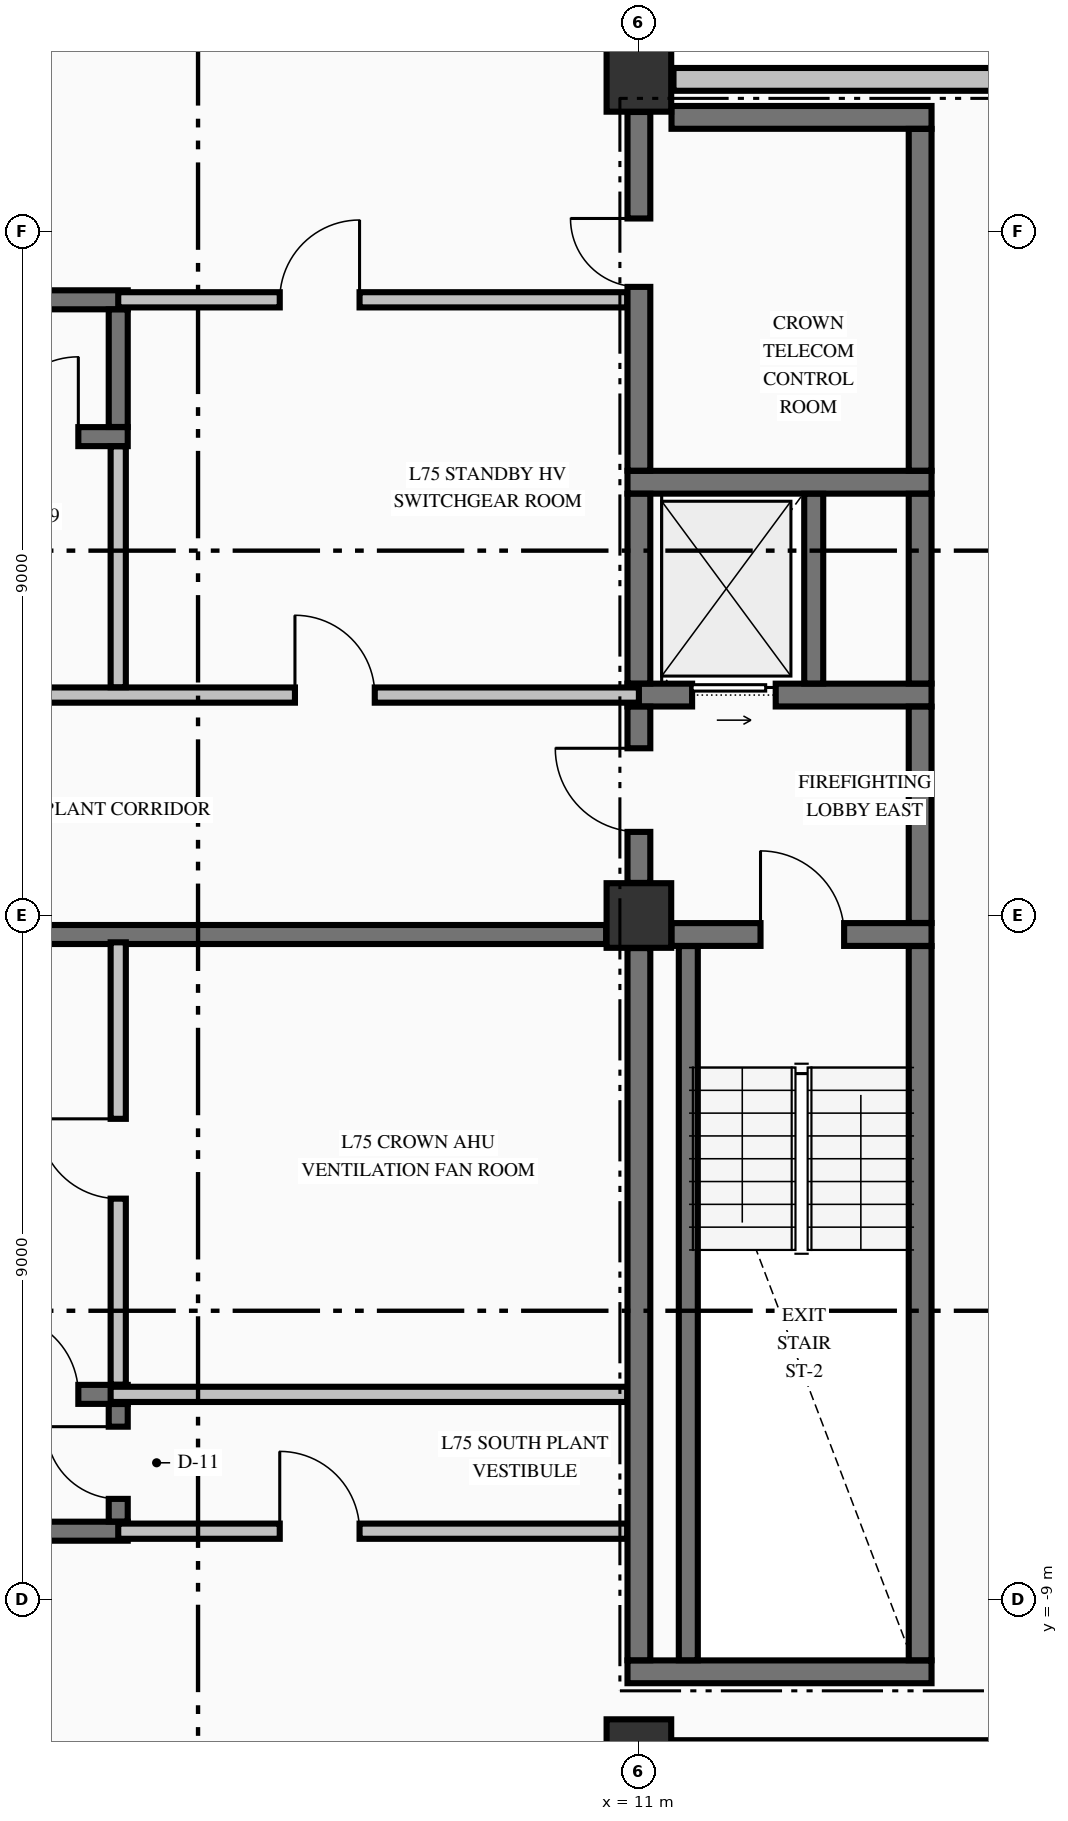
"""IFC4 building model, lengths in metres.
Left out: names, types, materials, properties, quantities, classifications, styles, units other than length and angle.
Written with IfcOpenShell. Run it as: python <this file> out.ifc"""

import sys

from ifc_helpers import new_model, si_unit, direction, frame, frame_2d, origin, origin_2d, place, context, subcontext, project, spatial, rectangle, extrude, element, fill, save


model = new_model("IFC4")
c1 = context("Model", 3, precision=1e-05, world=origin(), true_north=direction((0.0, 1.0)))
c2 = subcontext(c1, "Body", "Model", "MODEL_VIEW")
j1 = project(units=[si_unit("LENGTHUNIT", "METRE"), si_unit("PLANEANGLEUNIT", "RADIAN")], contexts=[c1])
p1 = place(None, origin())
s1 = spatial("IfcSite", under=j1, at=p1, CompositionType="ELEMENT")
p2 = place(p1, origin())
s2 = spatial("IfcBuilding", under=s1, at=p2, CompositionType="ELEMENT")
p3 = place(p2, frame((0.0, 0.0, 281.8)))
s3 = spatial("IfcBuildingStorey", under=s2, at=p3, CompositionType="ELEMENT", Elevation=281.8)
for number, where, z_axis, x_axis in (
    (1, (11.0, -11.0, -0.325), (0.0, 0.0, 1.0), (1.0, 0.0, 0.0)),
    (2, (11.0, 11.0, -0.325), (0.0, 0.0, 1.0), (1.0, 0.0, 0.0)),
    (3, (11.0, 0.0, -0.325), (0.0, 0.0, 1.0), (1.0, 0.0, 0.0)),
):
    element("IfcColumn", number, at=place(p3, frame(where, z_axis=z_axis, x_axis=x_axis)), inside=s3, PredefinedType="COLUMN", context=c2, shape_type="SweptSolid", body=[
        extrude(rectangle(XDim=0.85, YDim=0.85, at=origin_2d()), origin(), (0.0, 0.0, 1.0), 3.06),
    ])
for number, where, z_axis, x_axis in (
    (4, (11.455, -11.0, 0.0), (0.0, 0.0, 1.0), (1.0, 0.0, 0.0)),
    (5, (19.545, 11.0, 0.0), (0.0, 0.0, 1.0), (-1.0, 0.0, 0.0)),
):
    element("IfcWall", number, at=place(p3, frame(where, z_axis=z_axis, x_axis=x_axis)), inside=s3, PredefinedType="STANDARD", context=c2, shape_type="SweptSolid", body=[
        extrude(rectangle(XDim=8.09, YDim=0.3, at=frame_2d((4.045, 0.0))), origin(), (0.0, 0.0, 1.0), 1.077),
    ])
p4 = place(p3, frame((10.85, -9.95, 0.0), z_axis=(0.0, 0.0, 1.0), x_axis=(1.0, 0.0, 0.0)))
e6 = element("IfcWall", 6, at=p4, inside=s3, PredefinedType="SHEAR", context=c2, shape_type="SweptSolid", body=[
    extrude(rectangle(XDim=4.0, YDim=0.3, at=frame_2d((2.0, 0.0))), origin(), (0.0, 0.0, 1.0), 2.735),
])
p5 = place(p3, frame((-4.475, -8.1, 0.0), z_axis=(0.0, 0.0, 1.0), x_axis=(1.0, 0.0, 0.0)))
e7 = element("IfcWall", 7, at=p5, inside=s3, PredefinedType="SOLIDWALL", context=c2, shape_type="SweptSolid", body=[
    extrude(rectangle(XDim=8.75, YDim=0.25, at=frame_2d((4.375, 0.0))), origin(), (0.0, 0.0, 1.0), 2.735),
])
p6 = place(p3, frame((-4.475, -6.3, 0.0), z_axis=(0.0, 0.0, 1.0), x_axis=(1.0, 0.0, 0.0)))
e8 = element("IfcWall", 8, at=p6, inside=s3, PredefinedType="SOLIDWALL", context=c2, shape_type="SweptSolid", body=[
    extrude(rectangle(XDim=8.75, YDim=0.25, at=frame_2d((4.375, 0.0))), origin(), (0.0, 0.0, 1.0), 2.735),
])
p7 = place(p6, frame((7.05, 0.0, 0.0)))
e9 = element("IfcOpeningElement", 9, at=p7, cuts=e8, PredefinedType="OPENING", context=c2, shape_type="SweptSolid", body=[
    extrude(rectangle(XDim=1.05, YDim=2.15, at=frame_2d((0.525, 1.075))), frame((0.0, 0.135, 0.0), z_axis=(0.0, -1.0, 0.0), x_axis=(1.0, 0.0, 0.0)), (0.0, 0.0, 1.0), 0.27),
])
p8 = place(p3, frame((11.429, -0.25, 0.0), z_axis=(0.0, 0.0, 1.0), x_axis=(1.0, 0.0, 0.0)))
e10 = element("IfcWall", 10, at=p8, inside=s3, PredefinedType="SHEAR", context=c2, shape_type="SweptSolid", body=[
    extrude(rectangle(XDim=3.421, YDim=0.3, at=frame_2d((1.71, 0.0))), origin(), (0.0, 0.0, 1.0), 2.735),
])
p9 = place(p8, frame((1.171, 0.0, 0.0)))
e11 = element("IfcOpeningElement", 11, at=p9, cuts=e10, PredefinedType="OPENING", context=c2, shape_type="SweptSolid", body=[
    extrude(rectangle(XDim=1.1, YDim=2.15, at=frame_2d((0.55, 1.075))), frame((0.0, 0.16, 0.0), z_axis=(0.0, -1.0, 0.0), x_axis=(1.0, 0.0, 0.0)), (0.0, 0.0, 1.0), 0.32),
])
p10 = place(p3, frame((10.85, 2.9, 0.0), z_axis=(0.0, 0.0, 1.0), x_axis=(1.0, 0.0, 0.0)))
e12 = element("IfcWall", 12, at=p10, inside=s3, PredefinedType="SHEAR", context=c2, shape_type="SweptSolid", body=[
    extrude(rectangle(XDim=4.0, YDim=0.3, at=frame_2d((2.0, 0.0))), origin(), (0.0, 0.0, 1.0), 2.735),
])
p11 = place(p10, frame((0.85, 0.0, 0.0)))
e13 = element("IfcOpeningElement", 13, at=p11, cuts=e12, PredefinedType="OPENING", context=c2, shape_type="SweptSolid", body=[
    extrude(rectangle(XDim=1.1, YDim=2.2, at=frame_2d((0.55, 1.1))), frame((0.0, 0.16, 0.0), z_axis=(0.0, -1.0, 0.0), x_axis=(1.0, 0.0, 0.0)), (0.0, 0.0, 1.0), 0.32),
])
p12 = place(p3, frame((10.85, 5.7, 0.0), z_axis=(0.0, 0.0, 1.0), x_axis=(1.0, 0.0, 0.0)))
e14 = element("IfcWall", 14, at=p12, inside=s3, PredefinedType="SHEAR", context=c2, shape_type="SweptSolid", body=[
    extrude(rectangle(XDim=4.0, YDim=0.3, at=frame_2d((2.0, 0.0))), origin(), (0.0, 0.0, 1.0), 2.735),
])
p13 = place(p3, frame((-4.475, 6.3, 0.0), z_axis=(0.0, 0.0, 1.0), x_axis=(1.0, 0.0, 0.0)))
e15 = element("IfcWall", 15, at=p13, inside=s3, PredefinedType="SOLIDWALL", context=c2, shape_type="SweptSolid", body=[
    extrude(rectangle(XDim=8.75, YDim=0.25, at=frame_2d((4.375, 0.0))), origin(), (0.0, 0.0, 1.0), 2.735),
])
p14 = place(p13, frame((7.05, 0.0, 0.0)))
e16 = element("IfcOpeningElement", 16, at=p14, cuts=e15, PredefinedType="OPENING", context=c2, shape_type="SweptSolid", body=[
    extrude(rectangle(XDim=1.05, YDim=2.15, at=frame_2d((0.525, 1.075))), frame((0.0, 0.135, 0.0), z_axis=(0.0, -1.0, 0.0), x_axis=(1.0, 0.0, 0.0)), (0.0, 0.0, 1.0), 0.27),
])
p15 = place(p3, frame((-4.475, 8.1, 0.0), z_axis=(0.0, 0.0, 1.0), x_axis=(1.0, 0.0, 0.0)))
e17 = element("IfcWall", 17, at=p15, inside=s3, PredefinedType="SOLIDWALL", context=c2, shape_type="SweptSolid", body=[
    extrude(rectangle(XDim=8.75, YDim=0.25, at=frame_2d((4.375, 0.0))), origin(), (0.0, 0.0, 1.0), 2.735),
])
p16 = place(p3, frame((11.429, 10.5, 0.0), z_axis=(0.0, 0.0, 1.0), x_axis=(1.0, 0.0, 0.0)))
e18 = element("IfcWall", 18, at=p16, inside=s3, PredefinedType="SHEAR", context=c2, shape_type="SweptSolid", body=[
    extrude(rectangle(XDim=3.421, YDim=0.3, at=frame_2d((1.71, 0.0))), origin(), (0.0, 0.0, 1.0), 2.735),
])
p17 = place(p3, frame((4.15, -8.1, 0.0), z_axis=(0.0, 0.0, 1.0), x_axis=(1.0, 0.0, 0.0)))
e19 = element("IfcWall", 19, at=p17, inside=s3, PredefinedType="PARTITIONING", context=c2, shape_type="SweptSolid", body=[
    extrude(rectangle(XDim=6.697, YDim=0.2, at=frame_2d((3.349, 0.0))), origin(), (0.0, 0.0, 1.0), 2.735),
])
p18 = place(p17, frame((2.125, 0.0, 0.0)))
e20 = element("IfcOpeningElement", 20, at=p18, cuts=e19, PredefinedType="OPENING", context=c2, shape_type="SweptSolid", body=[
    extrude(rectangle(XDim=1.05, YDim=2.15, at=frame_2d((0.525, 1.075))), frame((0.0, 0.11, 0.0), z_axis=(0.0, -1.0, 0.0), x_axis=(1.0, 0.0, 0.0)), (0.0, 0.0, 1.0), 0.22),
])
p19 = place(p3, frame((4.05, -6.3, 0.0), z_axis=(0.0, 0.0, 1.0), x_axis=(1.0, 0.0, 0.0)))
e21 = element("IfcWall", 21, at=p19, inside=s3, PredefinedType="PARTITIONING", context=c2, shape_type="SweptSolid", body=[
    extrude(rectangle(XDim=6.797, YDim=0.2, at=frame_2d((3.398, 0.0))), origin(), (0.0, 0.0, 1.0), 2.735),
])
p20 = place(p3, frame((-10.569, -0.25, 0.0), z_axis=(0.0, 0.0, 1.0), x_axis=(1.0, 0.0, 0.0)))
e22 = element("IfcWall", 22, at=p20, inside=s3, PredefinedType="SOLIDWALL", context=c2, shape_type="SweptSolid", body=[
    extrude(rectangle(XDim=21.138, YDim=0.25, at=frame_2d((10.569, 0.0))), origin(), (0.0, 0.0, 1.0), 2.735),
])
p21 = place(p20, frame((7.519, 0.0, 0.0)))
e23 = element("IfcOpeningElement", 23, at=p21, cuts=e22, PredefinedType="OPENING", context=c2, shape_type="SweptSolid", body=[
    extrude(rectangle(XDim=0.95, YDim=2.02, at=frame_2d((0.475, 1.01))), frame((0.0, 0.135, 0.0), z_axis=(0.0, -1.0, 0.0), x_axis=(1.0, 0.0, 0.0)), (0.0, 0.0, 1.0), 0.27),
])
p22 = place(p3, frame((-11.0, 2.9, 0.0), z_axis=(0.0, 0.0, 1.0), x_axis=(1.0, 0.0, 0.0)))
e24 = element("IfcWall", 24, at=p22, inside=s3, PredefinedType="PARTITIONING", context=c2, shape_type="SweptSolid", body=[
    extrude(rectangle(XDim=22.0, YDim=0.2, at=frame_2d((11.0, 0.0))), origin(), (0.0, 0.0, 1.0), 2.735),
])
p23 = place(p22, frame((7.95, 0.0, 0.0)))
e25 = element("IfcOpeningElement", 25, at=p23, cuts=e24, PredefinedType="OPENING", context=c2, shape_type="SweptSolid", body=[
    extrude(rectangle(XDim=1.1, YDim=2.15, at=frame_2d((0.55, 1.075))), frame((0.0, 0.11, 0.0), z_axis=(0.0, -1.0, 0.0), x_axis=(1.0, 0.0, 0.0)), (0.0, 0.0, 1.0), 0.22),
])
p24 = place(p22, frame((17.475, 0.0, 0.0)))
e26 = element("IfcOpeningElement", 26, at=p24, cuts=e24, PredefinedType="OPENING", context=c2, shape_type="SweptSolid", body=[
    extrude(rectangle(XDim=1.05, YDim=2.15, at=frame_2d((0.525, 1.075))), frame((0.0, 0.11, 0.0), z_axis=(0.0, -1.0, 0.0), x_axis=(1.0, 0.0, 0.0)), (0.0, 0.0, 1.0), 0.22),
])
p25 = place(p22, frame((3.475, 0.0, 0.0)))
e27 = element("IfcOpeningElement", 27, at=p25, cuts=e24, PredefinedType="OPENING", context=c2, shape_type="SweptSolid", body=[
    extrude(rectangle(XDim=1.05, YDim=2.15, at=frame_2d((0.525, 1.075))), frame((0.0, 0.11, 0.0), z_axis=(0.0, -1.0, 0.0), x_axis=(1.0, 0.0, 0.0)), (0.0, 0.0, 1.0), 0.22),
])
p26 = place(p3, frame((4.15, 8.1, 0.0), z_axis=(0.0, 0.0, 1.0), x_axis=(1.0, 0.0, 0.0)))
e28 = element("IfcWall", 28, at=p26, inside=s3, PredefinedType="PARTITIONING", context=c2, shape_type="SweptSolid", body=[
    extrude(rectangle(XDim=6.697, YDim=0.2, at=frame_2d((3.349, 0.0))), origin(), (0.0, 0.0, 1.0), 2.735),
])
p27 = place(p26, frame((2.125, 0.0, 0.0)))
e29 = element("IfcOpeningElement", 29, at=p27, cuts=e28, PredefinedType="OPENING", context=c2, shape_type="SweptSolid", body=[
    extrude(rectangle(XDim=1.05, YDim=2.15, at=frame_2d((0.525, 1.075))), frame((0.0, 0.11, 0.0), z_axis=(0.0, -1.0, 0.0), x_axis=(1.0, 0.0, 0.0)), (0.0, 0.0, 1.0), 0.22),
])
p28 = place(p3, frame((4.15, -7.973, 0.0), z_axis=(0.0, 0.0, 1.0), x_axis=(0.0, 1.0, 0.0)))
e30 = element("IfcWall", 30, at=p28, inside=s3, PredefinedType="SOLIDWALL", context=c2, shape_type="SweptSolid", body=[
    extrude(rectangle(XDim=1.546, YDim=0.25, at=frame_2d((0.773, 0.0))), origin(), (0.0, 0.0, 1.0), 2.735),
])
p29 = place(p28, frame((0.298, 0.0, 0.0)))
e31 = element("IfcOpeningElement", 31, at=p29, cuts=e30, PredefinedType="OPENING", context=c2, shape_type="SweptSolid", body=[
    extrude(rectangle(XDim=0.95, YDim=2.15, at=frame_2d((0.475, 1.075))), frame((0.0, 0.135, 0.0), z_axis=(0.0, -1.0, 0.0), x_axis=(1.0, 0.0, 0.0)), (0.0, 0.0, 1.0), 0.27),
])
p30 = place(p3, frame((4.15, 6.427, 0.0), z_axis=(0.0, 0.0, 1.0), x_axis=(0.0, 1.0, 0.0)))
e32 = element("IfcWall", 32, at=p30, inside=s3, PredefinedType="SOLIDWALL", context=c2, shape_type="SweptSolid", body=[
    extrude(rectangle(XDim=1.546, YDim=0.25, at=frame_2d((0.773, 0.0))), origin(), (0.0, 0.0, 1.0), 2.735),
])
p31 = place(p3, frame((11.0, -9.798, 0.0), z_axis=(0.0, 0.0, 1.0), x_axis=(0.0, 1.0, 0.0)))
e33 = element("IfcWall", 33, at=p31, inside=s3, PredefinedType="SHEAR", context=c2, shape_type="SweptSolid", body=[
    extrude(rectangle(XDim=9.369, YDim=0.3, at=frame_2d((4.685, 0.0))), origin(), (0.0, 0.0, 1.0), 2.735),
])
p32 = place(p3, frame((11.0, 0.429, 0.0), z_axis=(0.0, 0.0, 1.0), x_axis=(0.0, 1.0, 0.0)))
e34 = element("IfcWall", 34, at=p32, inside=s3, PredefinedType="SHEAR", context=c2, shape_type="SweptSolid", body=[
    extrude(rectangle(XDim=2.319, YDim=0.3, at=frame_2d((1.16, 0.0))), origin(), (0.0, 0.0, 1.0), 2.735),
])
p33 = place(p32, frame((0.671, 0.0, 0.0)))
e35 = element("IfcOpeningElement", 35, at=p33, cuts=e34, PredefinedType="OPENING", context=c2, shape_type="SweptSolid", body=[
    extrude(rectangle(XDim=1.1, YDim=2.15, at=frame_2d((0.55, 1.075))), frame((0.0, 0.16, 0.0), z_axis=(0.0, -1.0, 0.0), x_axis=(1.0, 0.0, 0.0)), (0.0, 0.0, 1.0), 0.32),
])
p34 = place(p3, frame((11.0, 3.052, 0.0), z_axis=(0.0, 0.0, 1.0), x_axis=(0.0, 1.0, 0.0)))
e36 = element("IfcWall", 36, at=p34, inside=s3, PredefinedType="SHEAR", context=c2, shape_type="SweptSolid", body=[
    extrude(rectangle(XDim=2.496, YDim=0.3, at=frame_2d((1.248, 0.0))), origin(), (0.0, 0.0, 1.0), 2.735),
])
p35 = place(p3, frame((11.0, 5.852, 0.0), z_axis=(0.0, 0.0, 1.0), x_axis=(0.0, 1.0, 0.0)))
e37 = element("IfcWall", 37, at=p35, inside=s3, PredefinedType="SHEAR", context=c2, shape_type="SweptSolid", body=[
    extrude(rectangle(XDim=4.719, YDim=0.3, at=frame_2d((2.359, 0.0))), origin(), (0.0, 0.0, 1.0), 2.735),
])
p36 = place(p35, frame((2.418, 0.0, 0.0)))
e38 = element("IfcOpeningElement", 38, at=p36, cuts=e37, PredefinedType="OPENING", context=c2, shape_type="SweptSolid", body=[
    extrude(rectangle(XDim=0.9, YDim=2.15, at=frame_2d((0.45, 1.075))), frame((0.0, 0.16, 0.0), z_axis=(0.0, -1.0, 0.0), x_axis=(1.0, 0.0, 0.0)), (0.0, 0.0, 1.0), 0.32),
])
p37 = place(p3, frame((11.65, -9.798, 0.0), z_axis=(0.0, 0.0, 1.0), x_axis=(0.0, 1.0, 0.0)))
e39 = element("IfcWall", 39, at=p37, inside=s3, PredefinedType="SOLIDWALL", context=c2, shape_type="SweptSolid", body=[
    extrude(rectangle(XDim=9.396, YDim=0.25, at=frame_2d((4.698, 0.0))), origin(), (0.0, 0.0, 1.0), 2.735),
])
p38 = place(p3, frame((13.3, 3.052, 0.0), z_axis=(0.0, 0.0, 1.0), x_axis=(0.0, 1.0, 0.0)))
e40 = element("IfcWall", 40, at=p38, inside=s3, PredefinedType="SOLIDWALL", context=c2, shape_type="SweptSolid", body=[
    extrude(rectangle(XDim=2.496, YDim=0.25, at=frame_2d((1.248, 0.0))), origin(), (0.0, 0.0, 1.0), 2.735),
])
p39 = place(p3, frame((14.7, -9.798, 0.0), z_axis=(0.0, 0.0, 1.0), x_axis=(0.0, 1.0, 0.0)))
e41 = element("IfcWall", 41, at=p39, inside=s3, PredefinedType="SHEAR", context=c2, shape_type="SweptSolid", body=[
    extrude(rectangle(XDim=9.396, YDim=0.3, at=frame_2d((4.698, 0.0))), origin(), (0.0, 0.0, 1.0), 2.735),
])
p40 = place(p3, frame((14.7, -0.098, 0.0), z_axis=(0.0, 0.0, 1.0), x_axis=(0.0, 1.0, 0.0)))
e42 = element("IfcWall", 42, at=p40, inside=s3, PredefinedType="SHEAR", context=c2, shape_type="SweptSolid", body=[
    extrude(rectangle(XDim=2.846, YDim=0.3, at=frame_2d((1.423, 0.0))), origin(), (0.0, 0.0, 1.0), 2.735),
])
p41 = place(p3, frame((14.7, 3.052, 0.0), z_axis=(0.0, 0.0, 1.0), x_axis=(0.0, 1.0, 0.0)))
e43 = element("IfcWall", 43, at=p41, inside=s3, PredefinedType="SHEAR", context=c2, shape_type="SweptSolid", body=[
    extrude(rectangle(XDim=2.496, YDim=0.3, at=frame_2d((1.248, 0.0))), origin(), (0.0, 0.0, 1.0), 2.735),
])
p42 = place(p3, frame((14.7, 5.852, 0.0), z_axis=(0.0, 0.0, 1.0), x_axis=(0.0, 1.0, 0.0)))
e44 = element("IfcWall", 44, at=p42, inside=s3, PredefinedType="SHEAR", context=c2, shape_type="SweptSolid", body=[
    extrude(rectangle(XDim=4.496, YDim=0.3, at=frame_2d((2.248, 0.0))), origin(), (0.0, 0.0, 1.0), 2.735),
])
p43 = place(p3, frame((4.15, -6.172, 0.0), z_axis=(0.0, 0.0, 1.0), x_axis=(0.0, 1.0, 0.0)))
e45 = element("IfcWall", 45, at=p43, inside=s3, PredefinedType="PARTITIONING", context=c2, shape_type="SweptSolid", body=[
    extrude(rectangle(XDim=5.819, YDim=0.2, at=frame_2d((2.91, 0.0))), origin(), (0.0, 0.0, 1.0), 2.735),
])
p44 = place(p43, frame((2.447, 0.0, 0.0)))
e46 = element("IfcOpeningElement", 46, at=p44, cuts=e45, PredefinedType="OPENING", context=c2, shape_type="SweptSolid", body=[
    extrude(rectangle(XDim=1.05, YDim=2.15, at=frame_2d((0.525, 1.075))), frame((0.0, 0.11, 0.0), z_axis=(0.0, -1.0, 0.0), x_axis=(1.0, 0.0, 0.0)), (0.0, 0.0, 1.0), 0.22),
])
p45 = place(p3, frame((4.15, 3.003, 0.0), z_axis=(0.0, 0.0, 1.0), x_axis=(0.0, 1.0, 0.0)))
e47 = element("IfcWall", 47, at=p45, inside=s3, PredefinedType="PARTITIONING", context=c2, shape_type="SweptSolid", body=[
    extrude(rectangle(XDim=3.169, YDim=0.2, at=frame_2d((1.584, 0.0))), origin(), (0.0, 0.0, 1.0), 2.735),
])
p46 = place(p9, origin())
e48 = element("IfcDoor", 48, at=p46, inside=s3, OperationType="SINGLE_SWING_LEFT", PredefinedType="DOOR", context=c2, shape_type="SweptSolid", body=[
    extrude(rectangle(XDim=1.1, YDim=2.15, at=frame_2d((0.55, 1.075))), frame((0.0, 0.025, 0.0), z_axis=(0.0, -1.0, 0.0), x_axis=(1.0, 0.0, 0.0)), (0.0, 0.0, 1.0), 0.05),
])
fill(e11, e48)
p47 = place(p33, origin())
e49 = element("IfcDoor", 49, at=p47, inside=s3, OperationType="SINGLE_SWING_RIGHT", PredefinedType="DOOR", context=c2, shape_type="SweptSolid", body=[
    extrude(rectangle(XDim=1.1, YDim=2.15, at=frame_2d((0.55, 1.075))), frame((0.0, 0.025, 0.0), z_axis=(0.0, -1.0, 0.0), x_axis=(1.0, 0.0, 0.0)), (0.0, 0.0, 1.0), 0.05),
])
fill(e35, e49)
p48 = place(p11, origin())
e50 = element("IfcDoor", 50, at=p48, inside=s3, OperationType="SLIDING_TO_RIGHT", PredefinedType="DOOR", context=c2, shape_type="SweptSolid", body=[
    extrude(rectangle(XDim=1.1, YDim=2.2, at=frame_2d((0.55, 1.1))), frame((0.0, 0.025, 0.0), z_axis=(0.0, -1.0, 0.0), x_axis=(1.0, 0.0, 0.0)), (0.0, 0.0, 1.0), 0.05),
])
fill(e13, e50)
p49 = place(p36, origin())
e51 = element("IfcDoor", 51, at=p49, inside=s3, OperationType="SINGLE_SWING_RIGHT", PredefinedType="DOOR", context=c2, shape_type="SweptSolid", body=[
    extrude(rectangle(XDim=0.9, YDim=2.15, at=frame_2d((0.45, 1.075))), frame((0.0, 0.025, 0.0), z_axis=(0.0, -1.0, 0.0), x_axis=(1.0, 0.0, 0.0)), (0.0, 0.0, 1.0), 0.05),
])
fill(e38, e51)
p50 = place(p7, origin())
e52 = element("IfcDoor", 52, at=p50, inside=s3, OperationType="SINGLE_SWING_LEFT", PredefinedType="DOOR", context=c2, shape_type="SweptSolid", body=[
    extrude(rectangle(XDim=1.05, YDim=2.15, at=frame_2d((0.525, 1.075))), frame((0.0, 0.025, 0.0), z_axis=(0.0, -1.0, 0.0), x_axis=(1.0, 0.0, 0.0)), (0.0, 0.0, 1.0), 0.05),
])
fill(e9, e52)
p51 = place(p14, origin())
e53 = element("IfcDoor", 53, at=p51, inside=s3, OperationType="SINGLE_SWING_RIGHT", PredefinedType="DOOR", context=c2, shape_type="SweptSolid", body=[
    extrude(rectangle(XDim=1.05, YDim=2.15, at=frame_2d((0.525, 1.075))), frame((0.0, 0.025, 0.0), z_axis=(0.0, -1.0, 0.0), x_axis=(1.0, 0.0, 0.0)), (0.0, 0.0, 1.0), 0.05),
])
fill(e16, e53)
p52 = place(p44, origin())
e54 = element("IfcDoor", 54, at=p52, inside=s3, OperationType="SINGLE_SWING_RIGHT", PredefinedType="DOOR", context=c2, shape_type="SweptSolid", body=[
    extrude(rectangle(XDim=1.05, YDim=2.15, at=frame_2d((0.525, 1.075))), frame((0.0, 0.025, 0.0), z_axis=(0.0, -1.0, 0.0), x_axis=(1.0, 0.0, 0.0)), (0.0, 0.0, 1.0), 0.05),
])
fill(e46, e54)
p53 = place(p24, origin())
e55 = element("IfcDoor", 55, at=p53, inside=s3, OperationType="SINGLE_SWING_LEFT", PredefinedType="DOOR", context=c2, shape_type="SweptSolid", body=[
    extrude(rectangle(XDim=1.05, YDim=2.15, at=frame_2d((0.525, 1.075))), frame((0.0, 0.025, 0.0), z_axis=(0.0, -1.0, 0.0), x_axis=(1.0, 0.0, 0.0)), (0.0, 0.0, 1.0), 0.05),
])
fill(e26, e55)
p54 = place(p27, origin())
e56 = element("IfcDoor", 56, at=p54, inside=s3, OperationType="SINGLE_SWING_RIGHT", PredefinedType="DOOR", context=c2, shape_type="SweptSolid", body=[
    extrude(rectangle(XDim=1.05, YDim=2.15, at=frame_2d((0.525, 1.075))), frame((0.0, 0.025, 0.0), z_axis=(0.0, -1.0, 0.0), x_axis=(1.0, 0.0, 0.0)), (0.0, 0.0, 1.0), 0.05),
])
fill(e29, e56)
p55 = place(p29, origin())
e57 = element("IfcDoor", 57, at=p55, inside=s3, OperationType="SINGLE_SWING_RIGHT", PredefinedType="DOOR", context=c2, shape_type="SweptSolid", body=[
    extrude(rectangle(XDim=0.95, YDim=2.15, at=frame_2d((0.475, 1.075))), frame((0.0, 0.025, 0.0), z_axis=(0.0, -1.0, 0.0), x_axis=(1.0, 0.0, 0.0)), (0.0, 0.0, 1.0), 0.05),
])
fill(e31, e57)
p56 = place(p18, origin())
e58 = element("IfcDoor", 58, at=p56, inside=s3, OperationType="SINGLE_SWING_LEFT", PredefinedType="DOOR", context=c2, shape_type="SweptSolid", body=[
    extrude(rectangle(XDim=1.05, YDim=2.15, at=frame_2d((0.525, 1.075))), frame((0.0, 0.025, 0.0), z_axis=(0.0, -1.0, 0.0), x_axis=(1.0, 0.0, 0.0)), (0.0, 0.0, 1.0), 0.05),
])
fill(e20, e58)
save(model, sys.argv[1])
